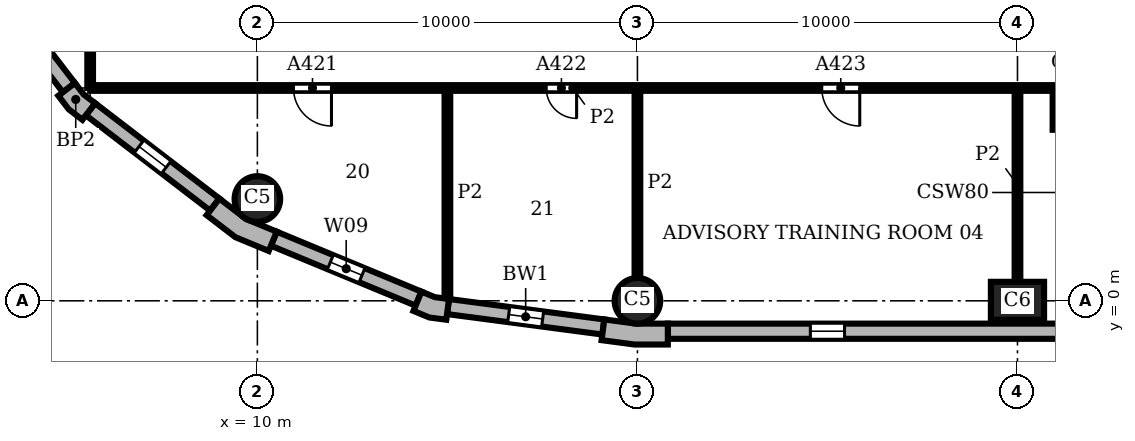
"""IFC4 building model, lengths in metres.
Left out: names, types, materials, properties, quantities, classifications, styles, units other than length and angle.
Written with IfcOpenShell. Run it as: python <this file> out.ifc"""

import sys

from ifc_helpers import new_model, si_unit, direction, frame, frame_2d, origin, origin_2d, place, context, subcontext, project, spatial, polyline, rectangle, circle, outline, extrude, element, fill, save


model = new_model("IFC4")
c1 = context("Model", 3, precision=1e-05, world=origin(), true_north=direction((0.0, 1.0)))
c2 = subcontext(c1, "Body", "Model", "MODEL_VIEW")
j1 = project(units=[si_unit("LENGTHUNIT", "METRE"), si_unit("PLANEANGLEUNIT", "RADIAN")], contexts=[c1])
p1 = place(None, origin())
s1 = spatial("IfcSite", under=j1, at=p1, CompositionType="ELEMENT")
p2 = place(p1, origin())
s2 = spatial("IfcBuilding", under=s1, at=p2, CompositionType="ELEMENT")
p3 = place(p2, frame((0.0, 0.0, 47.1)))
s3 = spatial("IfcBuildingStorey", under=s2, at=p3, CompositionType="ELEMENT", Elevation=47.1)
p4 = place(p3, frame((20.0, 0.0, 0.0), z_axis=(0.0, 0.0, 1.0), x_axis=(1.0, 0.0, 0.0)))
e1 = element("IfcColumn", 1, at=p4, inside=s3, PredefinedType="COLUMN", context=c2, shape_type="SweptSolid", body=[
    extrude(circle(Radius=0.6, at=origin_2d()), origin(), (0.0, 0.0, 1.0), 3.9),
])
p5 = place(p3, frame((30.0, 0.0, 0.0), z_axis=(0.0, 0.0, 1.0), x_axis=(1.0, 0.0, 0.0)))
e2 = element("IfcColumn", 2, at=p5, inside=s3, PredefinedType="COLUMN", context=c2, shape_type="SweptSolid", body=[
    extrude(rectangle(XDim=1.4, YDim=1.0, at=origin_2d()), origin(), (0.0, 0.0, 1.0), 3.9),
])
p6 = place(p3, frame((10.0, 2.679, 0.0), z_axis=(0.0, 0.0, 1.0), x_axis=(1.0, 0.0, 0.0)))
e3 = element("IfcColumn", 3, at=p6, inside=s3, PredefinedType="COLUMN", context=c2, shape_type="SweptSolid", body=[
    extrude(circle(Radius=0.6, at=origin_2d()), origin(), (0.0, 0.0, 1.0), 3.9),
])
p7 = place(p3, origin())
e4 = element("IfcWall", 4, at=p7, inside=s3, PredefinedType="SOLIDWALL", context=c2, shape_type="SweptSolid", body=[
    extrude(outline(polyline([(19.076, -0.887), (19.057, -1.036), (19.925, -1.15), (20.8, -1.15), (20.8, -1.0), (20.8, -0.6), (19.961, -0.6), (19.128, -0.49), (19.076, -0.887)])), origin(), (0.0, 0.0, 1.0), 3.9),
])
e5 = element("IfcWall", 5, at=p7, inside=s3, PredefinedType="SOLIDWALL", context=c2, shape_type="SweptSolid", body=[
    extrude(outline(polyline([(4.882, 5.487), (4.763, 5.396), (5.038, 5.038), (5.396, 4.763), (5.487, 4.882), (5.731, 5.199), (5.43, 5.43), (5.199, 5.731), (4.882, 5.487)])), origin(), (0.0, 0.0, 1.0), 3.9),
])
e6 = element("IfcWall", 6, at=p7, inside=s3, PredefinedType="SOLIDWALL", context=c2, shape_type="SweptSolid", body=[
    extrude(outline(polyline([(8.757, 2.373), (8.665, 2.254), (9.42, 1.675), (10.299, 1.311), (10.356, 1.449), (10.51, 1.819), (9.698, 2.155), (9.0, 2.69), (8.757, 2.373)])), origin(), (0.0, 0.0, 1.0), 3.9),
])
e7 = element("IfcWall", 7, at=p7, inside=s3, PredefinedType="SOLIDWALL", context=c2, shape_type="SweptSolid", body=[
    extrude(outline(polyline([(14.164, -0.128), (14.106, -0.266), (14.523, -0.439), (14.971, -0.498), (14.99, -0.349), (15.043, 0.047), (14.667, 0.097), (14.317, 0.242), (14.164, -0.128)])), origin(), (0.0, 0.0, 1.0), 3.9),
])
p8 = place(p3, frame((20.8, -0.8, 0.0), z_axis=(0.0, 0.0, 1.0), x_axis=(1.0, 0.0, 0.0)))
e8 = element("IfcWall", 8, at=p8, inside=s3, PredefinedType="SOLIDWALL", context=c2, shape_type="SweptSolid", body=[
    extrude(rectangle(XDim=48.4, YDim=0.4, at=frame_2d((24.2, 0.0))), origin(), (0.0, 0.0, 1.0), 3.9),
])
p9 = place(p8, frame((3.75, 0.0, 0.9)))
e9 = element("IfcOpeningElement", 9, at=p9, cuts=e8, PredefinedType="OPENING", context=c2, shape_type="SweptSolid", body=[
    extrude(rectangle(XDim=0.9, YDim=2.35, at=frame_2d((0.45, 1.175))), frame((0.0, 0.21, 0.0), z_axis=(0.0, -1.0, 0.0), x_axis=(1.0, 0.0, 0.0)), (0.0, 0.0, 1.0), 0.42),
])
p10 = place(p8, frame((13.75, 0.0, 0.9)))
e10 = element("IfcOpeningElement", 10, at=p10, cuts=e8, PredefinedType="OPENING", context=c2, shape_type="SweptSolid", body=[
    extrude(rectangle(XDim=0.9, YDim=2.35, at=frame_2d((0.45, 1.175))), frame((0.0, 0.21, 0.0), z_axis=(0.0, -1.0, 0.0), x_axis=(1.0, 0.0, 0.0)), (0.0, 0.0, 1.0), 0.42),
])
p11 = place(p8, frame((23.75, 0.0, 0.9)))
e11 = element("IfcOpeningElement", 11, at=p11, cuts=e8, PredefinedType="OPENING", context=c2, shape_type="SweptSolid", body=[
    extrude(rectangle(XDim=0.9, YDim=2.35, at=frame_2d((0.45, 1.175))), frame((0.0, 0.21, 0.0), z_axis=(0.0, -1.0, 0.0), x_axis=(1.0, 0.0, 0.0)), (0.0, 0.0, 1.0), 0.42),
])
p12 = place(p8, frame((33.75, 0.0, 0.9)))
e12 = element("IfcOpeningElement", 12, at=p12, cuts=e8, PredefinedType="OPENING", context=c2, shape_type="SweptSolid", body=[
    extrude(rectangle(XDim=0.9, YDim=2.35, at=frame_2d((0.45, 1.175))), frame((0.0, 0.21, 0.0), z_axis=(0.0, -1.0, 0.0), x_axis=(1.0, 0.0, 0.0)), (0.0, 0.0, 1.0), 0.42),
])
p13 = place(p8, frame((43.75, 0.0, 0.9)))
e13 = element("IfcOpeningElement", 13, at=p13, cuts=e8, PredefinedType="OPENING", context=c2, shape_type="SweptSolid", body=[
    extrude(rectangle(XDim=0.9, YDim=2.35, at=frame_2d((0.45, 1.175))), frame((0.0, 0.21, 0.0), z_axis=(0.0, -1.0, 0.0), x_axis=(1.0, 0.0, 0.0)), (0.0, 0.0, 1.0), 0.42),
])
p14 = place(p3, frame((2.532, 8.878, 0.0), z_axis=(0.0, 0.0, 1.0), x_axis=(0.608759824817, -0.793354571229, 0.0)))
e14 = element("IfcWall", 14, at=p14, inside=s3, PredefinedType="SOLIDWALL", context=c2, shape_type="SweptSolid", body=[
    extrude(rectangle(XDim=4.121, YDim=0.4, at=frame_2d((2.061, 0.0))), origin(), (0.0, 0.0, 1.0), 3.9),
])
p15 = place(p14, frame((1.611, 0.0, 0.9)))
e15 = element("IfcOpeningElement", 15, at=p15, cuts=e14, PredefinedType="OPENING", context=c2, shape_type="SweptSolid", body=[
    extrude(rectangle(XDim=0.9, YDim=2.35, at=frame_2d((0.45, 1.175))), frame((0.0, 0.21, 0.0), z_axis=(0.0, -1.0, 0.0), x_axis=(1.0, 0.0, 0.0)), (0.0, 0.0, 1.0), 0.42),
])
p16 = place(p3, frame((5.609, 5.041, 0.0), z_axis=(0.0, 0.0, 1.0), x_axis=(0.793354571229, -0.608759824817, 0.0)))
e16 = element("IfcWall", 16, at=p16, inside=s3, PredefinedType="SOLIDWALL", context=c2, shape_type="SweptSolid", body=[
    extrude(rectangle(XDim=4.121, YDim=0.4, at=frame_2d((2.061, 0.0))), origin(), (0.0, 0.0, 1.0), 3.9),
])
p17 = place(p16, frame((1.611, 0.0, 0.9)))
e17 = element("IfcOpeningElement", 17, at=p17, cuts=e16, PredefinedType="OPENING", context=c2, shape_type="SweptSolid", body=[
    extrude(rectangle(XDim=0.9, YDim=2.35, at=frame_2d((0.45, 1.175))), frame((0.0, 0.21, 0.0), z_axis=(0.0, -1.0, 0.0), x_axis=(1.0, 0.0, 0.0)), (0.0, 0.0, 1.0), 0.42),
])
p18 = place(p3, frame((10.433, 1.634, 0.0), z_axis=(0.0, 0.0, 1.0), x_axis=(0.923863744394, -0.382721546029, 0.0)))
e18 = element("IfcWall", 18, at=p18, inside=s3, PredefinedType="SOLIDWALL", context=c2, shape_type="SweptSolid", body=[
    extrude(rectangle(XDim=4.121, YDim=0.4, at=frame_2d((2.061, 0.0))), origin(), (0.0, 0.0, 1.0), 3.9),
])
p19 = place(p18, frame((1.611, 0.0, 0.9)))
e19 = element("IfcOpeningElement", 19, at=p19, cuts=e18, PredefinedType="OPENING", context=c2, shape_type="SweptSolid", body=[
    extrude(rectangle(XDim=0.9, YDim=2.35, at=frame_2d((0.45, 1.175))), frame((0.0, 0.21, 0.0), z_axis=(0.0, -1.0, 0.0), x_axis=(1.0, 0.0, 0.0)), (0.0, 0.0, 1.0), 0.42),
])
p20 = place(p3, frame((15.017, -0.151, 0.0), z_axis=(0.0, 0.0, 1.0), x_axis=(0.991446429508, -0.130514280502, 0.0)))
e20 = element("IfcWall", 20, at=p20, inside=s3, PredefinedType="SOLIDWALL", context=c2, shape_type="SweptSolid", body=[
    extrude(rectangle(XDim=4.121, YDim=0.4, at=frame_2d((2.061, 0.0))), origin(), (0.0, 0.0, 1.0), 3.9),
])
p21 = place(p20, frame((1.611, 0.0, 0.9)))
e21 = element("IfcOpeningElement", 21, at=p21, cuts=e20, PredefinedType="OPENING", context=c2, shape_type="SweptSolid", body=[
    extrude(rectangle(XDim=0.9, YDim=2.35, at=frame_2d((0.45, 1.175))), frame((0.0, 0.21, 0.0), z_axis=(0.0, -1.0, 0.0), x_axis=(1.0, 0.0, 0.0)), (0.0, 0.0, 1.0), 0.42),
])
p22 = place(p3, frame((5.6, 5.6, 0.0), z_axis=(0.0, 0.0, 1.0), x_axis=(0.0, 1.0, 0.0)))
e22 = element("IfcWall", 22, at=p22, inside=s3, PredefinedType="PARTITIONING", context=c2, shape_type="SweptSolid", body=[
    extrude(rectangle(XDim=54.4, YDim=0.15, at=frame_2d((27.2, 0.0))), origin(), (0.0, 0.0, 1.0), 3.58),
])
p23 = place(p22, frame((5.0, 0.0, 0.0)))
e23 = element("IfcOpeningElement", 23, at=p23, cuts=e22, PredefinedType="OPENING", context=c2, shape_type="SweptSolid", body=[
    extrude(rectangle(XDim=1.0, YDim=2.1, at=frame_2d((0.5, 1.05))), frame((0.0, 0.085, 0.0), z_axis=(0.0, -1.0, 0.0), x_axis=(1.0, 0.0, 0.0)), (0.0, 0.0, 1.0), 0.17),
])
p24 = place(p22, frame((11.75, 0.0, 0.0)))
e24 = element("IfcOpeningElement", 24, at=p24, cuts=e22, PredefinedType="OPENING", context=c2, shape_type="SweptSolid", body=[
    extrude(rectangle(XDim=1.0, YDim=2.1, at=frame_2d((0.5, 1.05))), frame((0.0, 0.085, 0.0), z_axis=(0.0, -1.0, 0.0), x_axis=(1.0, 0.0, 0.0)), (0.0, 0.0, 1.0), 0.17),
])
p25 = place(p22, frame((19.25, 0.0, 0.0)))
e25 = element("IfcOpeningElement", 25, at=p25, cuts=e22, PredefinedType="OPENING", context=c2, shape_type="SweptSolid", body=[
    extrude(rectangle(XDim=1.0, YDim=2.1, at=frame_2d((0.5, 1.05))), frame((0.0, 0.085, 0.0), z_axis=(0.0, -1.0, 0.0), x_axis=(1.0, 0.0, 0.0)), (0.0, 0.0, 1.0), 0.17),
])
p26 = place(p22, frame((29.8, 0.0, 0.0)))
e26 = element("IfcOpeningElement", 26, at=p26, cuts=e22, PredefinedType="OPENING", context=c2, shape_type="SweptSolid", body=[
    extrude(rectangle(XDim=1.0, YDim=2.1, at=frame_2d((0.5, 1.05))), frame((0.0, 0.085, 0.0), z_axis=(0.0, -1.0, 0.0), x_axis=(1.0, 0.0, 0.0)), (0.0, 0.0, 1.0), 0.17),
])
p27 = place(p22, frame((38.0, 0.0, 0.0)))
e27 = element("IfcOpeningElement", 27, at=p27, cuts=e22, PredefinedType="OPENING", context=c2, shape_type="SweptSolid", body=[
    extrude(rectangle(XDim=1.0, YDim=2.1, at=frame_2d((0.5, 1.05))), frame((0.0, 0.085, 0.0), z_axis=(0.0, -1.0, 0.0), x_axis=(1.0, 0.0, 0.0)), (0.0, 0.0, 1.0), 0.17),
])
p28 = place(p22, frame((48.25, 0.0, 0.0)))
e28 = element("IfcOpeningElement", 28, at=p28, cuts=e22, PredefinedType="OPENING", context=c2, shape_type="SweptSolid", body=[
    extrude(rectangle(XDim=1.0, YDim=2.1, at=frame_2d((0.5, 1.05))), frame((0.0, 0.085, 0.0), z_axis=(0.0, -1.0, 0.0), x_axis=(1.0, 0.0, 0.0)), (0.0, 0.0, 1.0), 0.17),
])
p29 = place(p3, frame((15.0, 0.063, 0.0), z_axis=(0.0, 0.0, 1.0), x_axis=(0.0, 1.0, 0.0)))
e29 = element("IfcWall", 29, at=p29, inside=s3, PredefinedType="PARTITIONING", context=c2, shape_type="SweptSolid", body=[
    extrude(rectangle(XDim=5.537, YDim=0.15, at=frame_2d((2.769, 0.0))), origin(), (0.0, 0.0, 1.0), 3.58),
])
p30 = place(p3, frame((20.0, 0.6, 0.0), z_axis=(0.0, 0.0, 1.0), x_axis=(0.0, 1.0, 0.0)))
e30 = element("IfcWall", 30, at=p30, inside=s3, PredefinedType="PARTITIONING", context=c2, shape_type="SweptSolid", body=[
    extrude(rectangle(XDim=5.0, YDim=0.15, at=frame_2d((2.5, 0.0))), origin(), (0.0, 0.0, 1.0), 3.58),
])
p31 = place(p3, frame((30.0, 0.5, 0.0), z_axis=(0.0, 0.0, 1.0), x_axis=(0.0, 1.0, 0.0)))
e31 = element("IfcWall", 31, at=p31, inside=s3, PredefinedType="PARTITIONING", context=c2, shape_type="SweptSolid", body=[
    extrude(rectangle(XDim=5.1, YDim=0.15, at=frame_2d((2.55, 0.0))), origin(), (0.0, 0.0, 1.0), 3.58),
])
p32 = place(p3, frame((31.0, 4.5, 0.0), z_axis=(0.0, 0.0, 1.0), x_axis=(0.0, 1.0, 0.0)))
e32 = element("IfcWall", 32, at=p32, inside=s3, PredefinedType="PARTITIONING", context=c2, shape_type="SweptSolid", body=[
    extrude(rectangle(XDim=1.1, YDim=0.15, at=frame_2d((0.55, 0.0))), origin(), (0.0, 0.0, 1.0), 3.58),
])
p33 = place(p3, frame((5.6, 5.6, 0.0), z_axis=(0.0, 0.0, 1.0), x_axis=(1.0, 0.0, 0.0)))
e33 = element("IfcWall", 33, at=p33, inside=s3, PredefinedType="PARTITIONING", context=c2, shape_type="SweptSolid", body=[
    extrude(rectangle(XDim=25.4, YDim=0.15, at=frame_2d((12.7, 0.0))), origin(), (0.0, 0.0, 1.0), 3.58),
])
p34 = place(p33, frame((5.35, 0.0, 0.0)))
e34 = element("IfcOpeningElement", 34, at=p34, cuts=e33, PredefinedType="OPENING", context=c2, shape_type="SweptSolid", body=[
    extrude(rectangle(XDim=1.0, YDim=2.1, at=frame_2d((0.5, 1.05))), frame((0.0, 0.085, 0.0), z_axis=(0.0, -1.0, 0.0), x_axis=(1.0, 0.0, 0.0)), (0.0, 0.0, 1.0), 0.17),
])
p35 = place(p33, frame((12.0, 0.0, 0.0)))
e35 = element("IfcOpeningElement", 35, at=p35, cuts=e33, PredefinedType="OPENING", context=c2, shape_type="SweptSolid", body=[
    extrude(rectangle(XDim=0.8, YDim=2.1, at=frame_2d((0.4, 1.05))), frame((0.0, 0.085, 0.0), z_axis=(0.0, -1.0, 0.0), x_axis=(1.0, 0.0, 0.0)), (0.0, 0.0, 1.0), 0.17),
])
p36 = place(p33, frame((19.25, 0.0, 0.0)))
e36 = element("IfcOpeningElement", 36, at=p36, cuts=e33, PredefinedType="OPENING", context=c2, shape_type="SweptSolid", body=[
    extrude(rectangle(XDim=1.0, YDim=2.1, at=frame_2d((0.5, 1.05))), frame((0.0, 0.085, 0.0), z_axis=(0.0, -1.0, 0.0), x_axis=(1.0, 0.0, 0.0)), (0.0, 0.0, 1.0), 0.17),
])
p37 = place(p9, origin())
e37 = element("IfcWindow", 37, at=p37, inside=s3, PartitioningType="SINGLE_PANEL", PredefinedType="WINDOW", context=c2, shape_type="SweptSolid", body=[
    extrude(rectangle(XDim=0.9, YDim=2.35, at=frame_2d((0.45, 1.175))), frame((0.0, 0.16, 0.0), z_axis=(0.0, -1.0, 0.0), x_axis=(1.0, 0.0, 0.0)), (0.0, 0.0, 1.0), 0.06),
])
fill(e9, e37)
p38 = place(p17, origin())
e38 = element("IfcWindow", 38, at=p38, inside=s3, PartitioningType="SINGLE_PANEL", PredefinedType="WINDOW", context=c2, shape_type="SweptSolid", body=[
    extrude(rectangle(XDim=0.9, YDim=2.35, at=frame_2d((0.45, 1.175))), frame((0.0, 0.16, 0.0), z_axis=(0.0, -1.0, 0.0), x_axis=(1.0, 0.0, 0.0)), (0.0, 0.0, 1.0), 0.06),
])
fill(e17, e38)
p39 = place(p19, origin())
e39 = element("IfcWindow", 39, at=p39, inside=s3, PartitioningType="SINGLE_PANEL", PredefinedType="WINDOW", context=c2, shape_type="SweptSolid", body=[
    extrude(rectangle(XDim=0.9, YDim=2.35, at=frame_2d((0.45, 1.175))), frame((0.0, 0.16, 0.0), z_axis=(0.0, -1.0, 0.0), x_axis=(1.0, 0.0, 0.0)), (0.0, 0.0, 1.0), 0.06),
])
fill(e19, e39)
p40 = place(p21, origin())
e40 = element("IfcWindow", 40, at=p40, inside=s3, PartitioningType="SINGLE_PANEL", PredefinedType="WINDOW", context=c2, shape_type="SweptSolid", body=[
    extrude(rectangle(XDim=0.9, YDim=2.35, at=frame_2d((0.45, 1.175))), frame((0.0, 0.16, 0.0), z_axis=(0.0, -1.0, 0.0), x_axis=(1.0, 0.0, 0.0)), (0.0, 0.0, 1.0), 0.06),
])
fill(e21, e40)
p41 = place(p34, frame((1.0, 0.0, 0.0), z_axis=(0.0, 0.0, 1.0), x_axis=(-1.0, 0.0, 0.0)))
e41 = element("IfcDoor", 41, at=p41, inside=s3, OperationType="SINGLE_SWING_LEFT", PredefinedType="DOOR", context=c2, shape_type="SweptSolid", body=[
    extrude(rectangle(XDim=1.0, YDim=2.1, at=frame_2d((0.5, 1.05))), frame((0.0, 0.025, 0.0), z_axis=(0.0, -1.0, 0.0), x_axis=(1.0, 0.0, 0.0)), (0.0, 0.0, 1.0), 0.05),
])
fill(e34, e41)
p42 = place(p35, frame((0.8, 0.0, 0.0), z_axis=(0.0, 0.0, 1.0), x_axis=(-1.0, 0.0, 0.0)))
e42 = element("IfcDoor", 42, at=p42, inside=s3, OperationType="SINGLE_SWING_LEFT", PredefinedType="DOOR", context=c2, shape_type="SweptSolid", body=[
    extrude(rectangle(XDim=0.8, YDim=2.1, at=frame_2d((0.4, 1.05))), frame((0.0, 0.025, 0.0), z_axis=(0.0, -1.0, 0.0), x_axis=(1.0, 0.0, 0.0)), (0.0, 0.0, 1.0), 0.05),
])
fill(e35, e42)
p43 = place(p36, frame((1.0, 0.0, 0.0), z_axis=(0.0, 0.0, 1.0), x_axis=(-1.0, 0.0, 0.0)))
e43 = element("IfcDoor", 43, at=p43, inside=s3, OperationType="SINGLE_SWING_LEFT", PredefinedType="DOOR", context=c2, shape_type="SweptSolid", body=[
    extrude(rectangle(XDim=1.0, YDim=2.1, at=frame_2d((0.5, 1.05))), frame((0.0, 0.025, 0.0), z_axis=(0.0, -1.0, 0.0), x_axis=(1.0, 0.0, 0.0)), (0.0, 0.0, 1.0), 0.05),
])
fill(e36, e43)
save(model, sys.argv[1])
